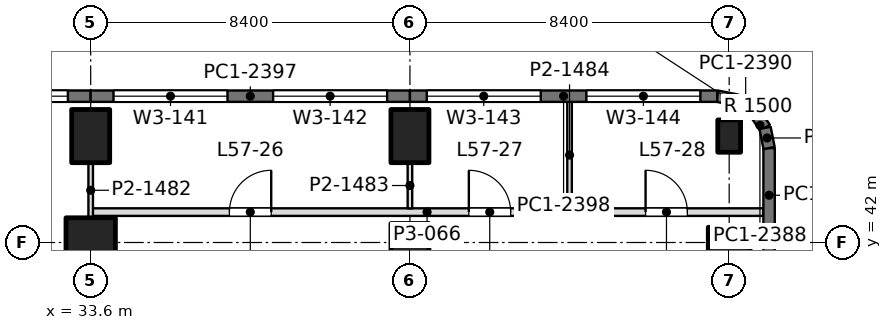
"""IFC4 building model, lengths in metres.
Left out: names, types, materials, properties, quantities, classifications, styles, units other than length and angle.
Written with IfcOpenShell. Run it as: python <this file> out.ifc"""

import sys

from ifc_helpers import new_model, si_unit, direction, frame, frame_2d, origin, origin_2d, place, context, subcontext, project, spatial, rectangle, extrude, element, fill, save


model = new_model("IFC4")
c1 = context("Model", 3, precision=1e-05, world=origin(), true_north=direction((0.0, 1.0)))
c2 = subcontext(c1, "Body", "Model", "MODEL_VIEW")
j1 = project(units=[si_unit("LENGTHUNIT", "METRE"), si_unit("PLANEANGLEUNIT", "RADIAN")], contexts=[c1])
p1 = place(None, origin())
s1 = spatial("IfcSite", under=j1, at=p1, CompositionType="ELEMENT")
p2 = place(p1, origin())
s2 = spatial("IfcBuilding", under=s1, at=p2, CompositionType="ELEMENT")
p3 = place(p2, frame((0.0, 0.0, 250.2)))
s3 = spatial("IfcBuildingStorey", under=s2, at=p3, CompositionType="ELEMENT", Elevation=250.2)
p4 = place(p3, frame((33.6, 42.0, 0.0), z_axis=(0.0, 0.0, 1.0), x_axis=(1.0, 0.0, 0.0)))
e1 = element("IfcColumn", 1, at=p4, inside=s3, PredefinedType="COLUMN", context=c2, shape_type="SweptSolid", body=[
    extrude(rectangle(XDim=1.3, YDim=1.3, at=origin_2d()), origin(), (0.0, 0.0, 1.0), 4.5),
])
p5 = place(p3, frame((33.6, 44.8, 0.0), z_axis=(0.0, 0.0, 1.0), x_axis=(1.0, 0.0, 0.0)))
e2 = element("IfcColumn", 2, at=p5, inside=s3, PredefinedType="COLUMN", context=c2, shape_type="SweptSolid", body=[
    extrude(rectangle(XDim=1.0, YDim=1.4, at=origin_2d()), origin(), (0.0, 0.0, 1.0), 4.5),
])
p6 = place(p3, frame((42.0, 42.0, 0.0), z_axis=(0.0, 0.0, 1.0), x_axis=(1.0, 0.0, 0.0)))
e3 = element("IfcColumn", 3, at=p6, inside=s3, PredefinedType="COLUMN", context=c2, shape_type="SweptSolid", body=[
    extrude(rectangle(XDim=1.0, YDim=1.0, at=origin_2d()), origin(), (0.0, 0.0, 1.0), 4.5),
])
p7 = place(p3, frame((42.0, 44.8, 0.0), z_axis=(0.0, 0.0, 1.0), x_axis=(1.0, 0.0, 0.0)))
e4 = element("IfcColumn", 4, at=p7, inside=s3, PredefinedType="COLUMN", context=c2, shape_type="SweptSolid", body=[
    extrude(rectangle(XDim=1.0, YDim=1.4, at=origin_2d()), origin(), (0.0, 0.0, 1.0), 4.5),
])
p8 = place(p3, frame((50.4, 42.0, 0.0), z_axis=(0.0, 0.0, 1.0), x_axis=(0.0, 1.0, 0.0)))
e5 = element("IfcColumn", 5, at=p8, inside=s3, PredefinedType="COLUMN", context=c2, shape_type="SweptSolid", body=[
    extrude(rectangle(XDim=0.8, YDim=1.1, at=origin_2d()), origin(), (0.0, 0.0, 1.0), 4.5),
])
p9 = place(p3, frame((50.4, 44.8, 0.0), z_axis=(0.0, 0.0, 1.0), x_axis=(1.0, 0.0, 0.0)))
e6 = element("IfcColumn", 6, at=p9, inside=s3, PredefinedType="COLUMN", context=c2, shape_type="SweptSolid", body=[
    extrude(rectangle(XDim=0.6, YDim=0.85, at=origin_2d()), origin(), (0.0, 0.0, 1.0), 4.5),
])
p10 = place(p3, frame((25.2, 45.85, 0.0), z_axis=(0.0, 0.0, 1.0), x_axis=(1.0, 0.0, 0.0)))
e7 = element("IfcWall", 7, at=p10, inside=s3, PredefinedType="SOLIDWALL", context=c2, shape_type="SweptSolid", body=[
    extrude(rectangle(XDim=8.4, YDim=0.3, at=frame_2d((4.2, 0.0))), origin(), (0.0, 0.0, 1.0), 4.35),
])
p11 = place(p10, frame((0.6, 0.0, 0.9)))
e8 = element("IfcOpeningElement", 8, at=p11, cuts=e7, PredefinedType="OPENING", context=c2, shape_type="SweptSolid", body=[
    extrude(rectangle(XDim=3.0, YDim=2.4, at=frame_2d((1.5, 1.2))), frame((0.0, 0.16, 0.0), z_axis=(0.0, -1.0, 0.0), x_axis=(1.0, 0.0, 0.0)), (0.0, 0.0, 1.0), 0.32),
])
p12 = place(p10, frame((4.8, 0.0, 0.9)))
e9 = element("IfcOpeningElement", 9, at=p12, cuts=e7, PredefinedType="OPENING", context=c2, shape_type="SweptSolid", body=[
    extrude(rectangle(XDim=3.0, YDim=2.4, at=frame_2d((1.5, 1.2))), frame((0.0, 0.16, 0.0), z_axis=(0.0, -1.0, 0.0), x_axis=(1.0, 0.0, 0.0)), (0.0, 0.0, 1.0), 0.32),
])
p13 = place(p3, frame((33.6, 45.85, 0.0), z_axis=(0.0, 0.0, 1.0), x_axis=(1.0, 0.0, 0.0)))
e10 = element("IfcWall", 10, at=p13, inside=s3, PredefinedType="SOLIDWALL", context=c2, shape_type="SweptSolid", body=[
    extrude(rectangle(XDim=8.4, YDim=0.3, at=frame_2d((4.2, 0.0))), origin(), (0.0, 0.0, 1.0), 4.35),
])
p14 = place(p13, frame((0.6, 0.0, 0.9)))
e11 = element("IfcOpeningElement", 11, at=p14, cuts=e10, PredefinedType="OPENING", context=c2, shape_type="SweptSolid", body=[
    extrude(rectangle(XDim=3.0, YDim=2.4, at=frame_2d((1.5, 1.2))), frame((0.0, 0.16, 0.0), z_axis=(0.0, -1.0, 0.0), x_axis=(1.0, 0.0, 0.0)), (0.0, 0.0, 1.0), 0.32),
])
p15 = place(p13, frame((4.8, 0.0, 0.9)))
e12 = element("IfcOpeningElement", 12, at=p15, cuts=e10, PredefinedType="OPENING", context=c2, shape_type="SweptSolid", body=[
    extrude(rectangle(XDim=3.0, YDim=2.4, at=frame_2d((1.5, 1.2))), frame((0.0, 0.16, 0.0), z_axis=(0.0, -1.0, 0.0), x_axis=(1.0, 0.0, 0.0)), (0.0, 0.0, 1.0), 0.32),
])
p16 = place(p3, frame((42.0, 45.85, 0.0), z_axis=(0.0, 0.0, 1.0), x_axis=(1.0, 0.0, 0.0)))
e13 = element("IfcWall", 13, at=p16, inside=s3, PredefinedType="SOLIDWALL", context=c2, shape_type="SweptSolid", body=[
    extrude(rectangle(XDim=8.085, YDim=0.3, at=frame_2d((4.042, 0.0))), origin(), (0.0, 0.0, 1.0), 4.35),
])
p17 = place(p16, frame((0.443, 0.0, 0.9)))
e14 = element("IfcOpeningElement", 14, at=p17, cuts=e13, PredefinedType="OPENING", context=c2, shape_type="SweptSolid", body=[
    extrude(rectangle(XDim=3.0, YDim=2.4, at=frame_2d((1.5, 1.2))), frame((0.0, 0.16, 0.0), z_axis=(0.0, -1.0, 0.0), x_axis=(1.0, 0.0, 0.0)), (0.0, 0.0, 1.0), 0.32),
])
p18 = place(p16, frame((4.643, 0.0, 0.9)))
e15 = element("IfcOpeningElement", 15, at=p18, cuts=e13, PredefinedType="OPENING", context=c2, shape_type="SweptSolid", body=[
    extrude(rectangle(XDim=3.0, YDim=2.4, at=frame_2d((1.5, 1.2))), frame((0.0, 0.16, 0.0), z_axis=(0.0, -1.0, 0.0), x_axis=(1.0, 0.0, 0.0)), (0.0, 0.0, 1.0), 0.32),
])
p19 = place(p3, frame((50.085, 45.85, 0.0), z_axis=(0.0, 0.0, 1.0), x_axis=(0.980702050465, -0.1955082817, 0.0)))
e16 = element("IfcWall", 16, at=p19, inside=s3, PredefinedType="SOLIDWALL", context=c2, shape_type="SweptSolid", body=[
    extrude(rectangle(XDim=0.541, YDim=0.3, at=frame_2d((0.271, 0.0))), origin(), (0.0, 0.0, 1.0), 4.35),
])
p20 = place(p3, frame((50.615, 45.744, 0.0), z_axis=(0.0, 0.0, 1.0), x_axis=(0.831692711774, -0.555236195849, 0.0)))
e17 = element("IfcWall", 17, at=p20, inside=s3, PredefinedType="SOLIDWALL", context=c2, shape_type="SweptSolid", body=[
    extrude(rectangle(XDim=0.525, YDim=0.3, at=frame_2d((0.263, 0.0))), origin(), (0.0, 0.0, 1.0), 4.35),
])
p21 = place(p3, frame((51.052, 45.453, 0.0), z_axis=(0.0, 0.0, 1.0), x_axis=(0.55534295404, -0.831621430339, 0.0)))
e18 = element("IfcWall", 18, at=p21, inside=s3, PredefinedType="SOLIDWALL", context=c2, shape_type="SweptSolid", body=[
    extrude(rectangle(XDim=0.526, YDim=0.3, at=frame_2d((0.263, 0.0))), origin(), (0.0, 0.0, 1.0), 4.35),
])
p22 = place(p3, frame((51.344, 45.015, 0.0), z_axis=(0.0, 0.0, 1.0), x_axis=(0.195073962632, -0.980788534345, 0.0)))
e19 = element("IfcWall", 19, at=p22, inside=s3, PredefinedType="SOLIDWALL", context=c2, shape_type="SweptSolid", body=[
    extrude(rectangle(XDim=0.541, YDim=0.3, at=frame_2d((0.271, 0.0))), origin(), (0.0, 0.0, 1.0), 4.35),
])
p23 = place(p3, frame((51.45, 44.485, 0.0), z_axis=(0.0, 0.0, 1.0), x_axis=(0.0, -1.0, 0.0)))
e20 = element("IfcWall", 20, at=p23, inside=s3, PredefinedType="SOLIDWALL", context=c2, shape_type="SweptSolid", body=[
    extrude(rectangle(XDim=2.485, YDim=0.3, at=frame_2d((1.243, 0.0))), origin(), (0.0, 0.0, 1.0), 4.35),
])
p24 = place(p3, frame((51.45, 42.0, 0.0), z_axis=(0.0, 0.0, 1.0), x_axis=(0.0, -1.0, 0.0)))
e21 = element("IfcWall", 21, at=p24, inside=s3, PredefinedType="SOLIDWALL", context=c2, shape_type="SweptSolid", body=[
    extrude(rectangle(XDim=4.35, YDim=0.3, at=frame_2d((2.175, 0.0))), origin(), (0.0, 0.0, 1.0), 4.35),
])
p25 = place(p24, frame((0.975, 0.0, 0.9)))
e22 = element("IfcOpeningElement", 22, at=p25, cuts=e21, PredefinedType="OPENING", context=c2, shape_type="SweptSolid", body=[
    extrude(rectangle(XDim=2.4, YDim=1.9, at=frame_2d((1.2, 0.95))), frame((0.0, 0.16, 0.0), z_axis=(0.0, -1.0, 0.0), x_axis=(1.0, 0.0, 0.0)), (0.0, 0.0, 1.0), 0.32),
])
p26 = place(p3, frame((33.6, 42.8, 0.0), z_axis=(0.0, 0.0, 1.0), x_axis=(1.0, 0.0, 0.0)))
e23 = element("IfcWall", 23, at=p26, inside=s3, PredefinedType="PARTITIONING", context=c2, shape_type="SweptSolid", body=[
    extrude(rectangle(XDim=17.702, YDim=0.2, at=frame_2d((8.851, 0.0))), origin(), (0.0, 0.0, 1.0), 3.86),
])
p27 = place(p26, frame((3.65, 0.0, 0.0)))
e24 = element("IfcOpeningElement", 24, at=p27, cuts=e23, PredefinedType="OPENING", context=c2, shape_type="SweptSolid", body=[
    extrude(rectangle(XDim=1.1, YDim=2.4, at=frame_2d((0.55, 1.2))), frame((0.0, 0.11, 0.0), z_axis=(0.0, -1.0, 0.0), x_axis=(1.0, 0.0, 0.0)), (0.0, 0.0, 1.0), 0.22),
])
p28 = place(p26, frame((9.95, 0.0, 0.0)))
e25 = element("IfcOpeningElement", 25, at=p28, cuts=e23, PredefinedType="OPENING", context=c2, shape_type="SweptSolid", body=[
    extrude(rectangle(XDim=1.1, YDim=2.4, at=frame_2d((0.55, 1.2))), frame((0.0, 0.11, 0.0), z_axis=(0.0, -1.0, 0.0), x_axis=(1.0, 0.0, 0.0)), (0.0, 0.0, 1.0), 0.22),
])
p29 = place(p26, frame((14.6, 0.0, 0.0)))
e26 = element("IfcOpeningElement", 26, at=p29, cuts=e23, PredefinedType="OPENING", context=c2, shape_type="SweptSolid", body=[
    extrude(rectangle(XDim=1.1, YDim=2.4, at=frame_2d((0.55, 1.2))), frame((0.0, 0.11, 0.0), z_axis=(0.0, -1.0, 0.0), x_axis=(1.0, 0.0, 0.0)), (0.0, 0.0, 1.0), 0.22),
])
p30 = place(p3, frame((33.6, 42.648, 0.0), z_axis=(0.0, 0.0, 1.0), x_axis=(0.0, 1.0, 0.0)))
e27 = element("IfcWall", 27, at=p30, inside=s3, PredefinedType="PARTITIONING", context=c2, shape_type="SweptSolid", body=[
    extrude(rectangle(XDim=1.453, YDim=0.12, at=frame_2d((0.727, 0.0))), origin(), (0.0, 0.0, 1.0), 3.99),
])
p31 = place(p3, frame((42.0, 42.898, 0.0), z_axis=(0.0, 0.0, 1.0), x_axis=(0.0, 1.0, 0.0)))
e28 = element("IfcWall", 28, at=p31, inside=s3, PredefinedType="PARTITIONING", context=c2, shape_type="SweptSolid", body=[
    extrude(rectangle(XDim=1.203, YDim=0.12, at=frame_2d((0.602, 0.0))), origin(), (0.0, 0.0, 1.0), 3.99),
])
p32 = place(p3, frame((46.2, 42.898, 0.0), z_axis=(0.0, 0.0, 1.0), x_axis=(0.0, 1.0, 0.0)))
e29 = element("IfcWall", 29, at=p32, inside=s3, PredefinedType="PARTITIONING", context=c2, shape_type="SweptSolid", body=[
    extrude(rectangle(XDim=2.804, YDim=0.12, at=frame_2d((1.402, 0.0))), origin(), (0.0, 0.0, 1.0), 3.86),
])
p33 = place(p12, origin())
e30 = element("IfcWindow", 30, at=p33, inside=s3, PartitioningType="SINGLE_PANEL", PredefinedType="WINDOW", context=c2, shape_type="SweptSolid", body=[
    extrude(rectangle(XDim=3.0, YDim=2.4, at=frame_2d((1.5, 1.2))), frame((0.0, 0.03, 0.0), z_axis=(0.0, -1.0, 0.0), x_axis=(1.0, 0.0, 0.0)), (0.0, 0.0, 1.0), 0.06),
])
fill(e9, e30)
p34 = place(p14, origin())
e31 = element("IfcWindow", 31, at=p34, inside=s3, PartitioningType="SINGLE_PANEL", PredefinedType="WINDOW", context=c2, shape_type="SweptSolid", body=[
    extrude(rectangle(XDim=3.0, YDim=2.4, at=frame_2d((1.5, 1.2))), frame((0.0, 0.03, 0.0), z_axis=(0.0, -1.0, 0.0), x_axis=(1.0, 0.0, 0.0)), (0.0, 0.0, 1.0), 0.06),
])
fill(e11, e31)
p35 = place(p15, origin())
e32 = element("IfcWindow", 32, at=p35, inside=s3, PartitioningType="SINGLE_PANEL", PredefinedType="WINDOW", context=c2, shape_type="SweptSolid", body=[
    extrude(rectangle(XDim=3.0, YDim=2.4, at=frame_2d((1.5, 1.2))), frame((0.0, 0.03, 0.0), z_axis=(0.0, -1.0, 0.0), x_axis=(1.0, 0.0, 0.0)), (0.0, 0.0, 1.0), 0.06),
])
fill(e12, e32)
p36 = place(p17, origin())
e33 = element("IfcWindow", 33, at=p36, inside=s3, PartitioningType="SINGLE_PANEL", PredefinedType="WINDOW", context=c2, shape_type="SweptSolid", body=[
    extrude(rectangle(XDim=3.0, YDim=2.4, at=frame_2d((1.5, 1.2))), frame((0.0, 0.03, 0.0), z_axis=(0.0, -1.0, 0.0), x_axis=(1.0, 0.0, 0.0)), (0.0, 0.0, 1.0), 0.06),
])
fill(e14, e33)
p37 = place(p18, origin())
e34 = element("IfcWindow", 34, at=p37, inside=s3, PartitioningType="SINGLE_PANEL", PredefinedType="WINDOW", context=c2, shape_type="SweptSolid", body=[
    extrude(rectangle(XDim=3.0, YDim=2.4, at=frame_2d((1.5, 1.2))), frame((0.0, 0.03, 0.0), z_axis=(0.0, -1.0, 0.0), x_axis=(1.0, 0.0, 0.0)), (0.0, 0.0, 1.0), 0.06),
])
fill(e15, e34)
p38 = place(p27, origin())
e35 = element("IfcDoor", 35, at=p38, inside=s3, OperationType="SINGLE_SWING_RIGHT", PredefinedType="DOOR", context=c2, shape_type="SweptSolid", body=[
    extrude(rectangle(XDim=1.1, YDim=2.4, at=frame_2d((0.55, 1.2))), frame((0.0, 0.025, 0.0), z_axis=(0.0, -1.0, 0.0), x_axis=(1.0, 0.0, 0.0)), (0.0, 0.0, 1.0), 0.05),
])
fill(e24, e35)
p39 = place(p28, origin())
e36 = element("IfcDoor", 36, at=p39, inside=s3, OperationType="SINGLE_SWING_LEFT", PredefinedType="DOOR", context=c2, shape_type="SweptSolid", body=[
    extrude(rectangle(XDim=1.1, YDim=2.4, at=frame_2d((0.55, 1.2))), frame((0.0, 0.025, 0.0), z_axis=(0.0, -1.0, 0.0), x_axis=(1.0, 0.0, 0.0)), (0.0, 0.0, 1.0), 0.05),
])
fill(e25, e36)
p40 = place(p29, origin())
e37 = element("IfcDoor", 37, at=p40, inside=s3, OperationType="SINGLE_SWING_LEFT", PredefinedType="DOOR", context=c2, shape_type="SweptSolid", body=[
    extrude(rectangle(XDim=1.1, YDim=2.4, at=frame_2d((0.55, 1.2))), frame((0.0, 0.025, 0.0), z_axis=(0.0, -1.0, 0.0), x_axis=(1.0, 0.0, 0.0)), (0.0, 0.0, 1.0), 0.05),
])
fill(e26, e37)
save(model, sys.argv[1])
